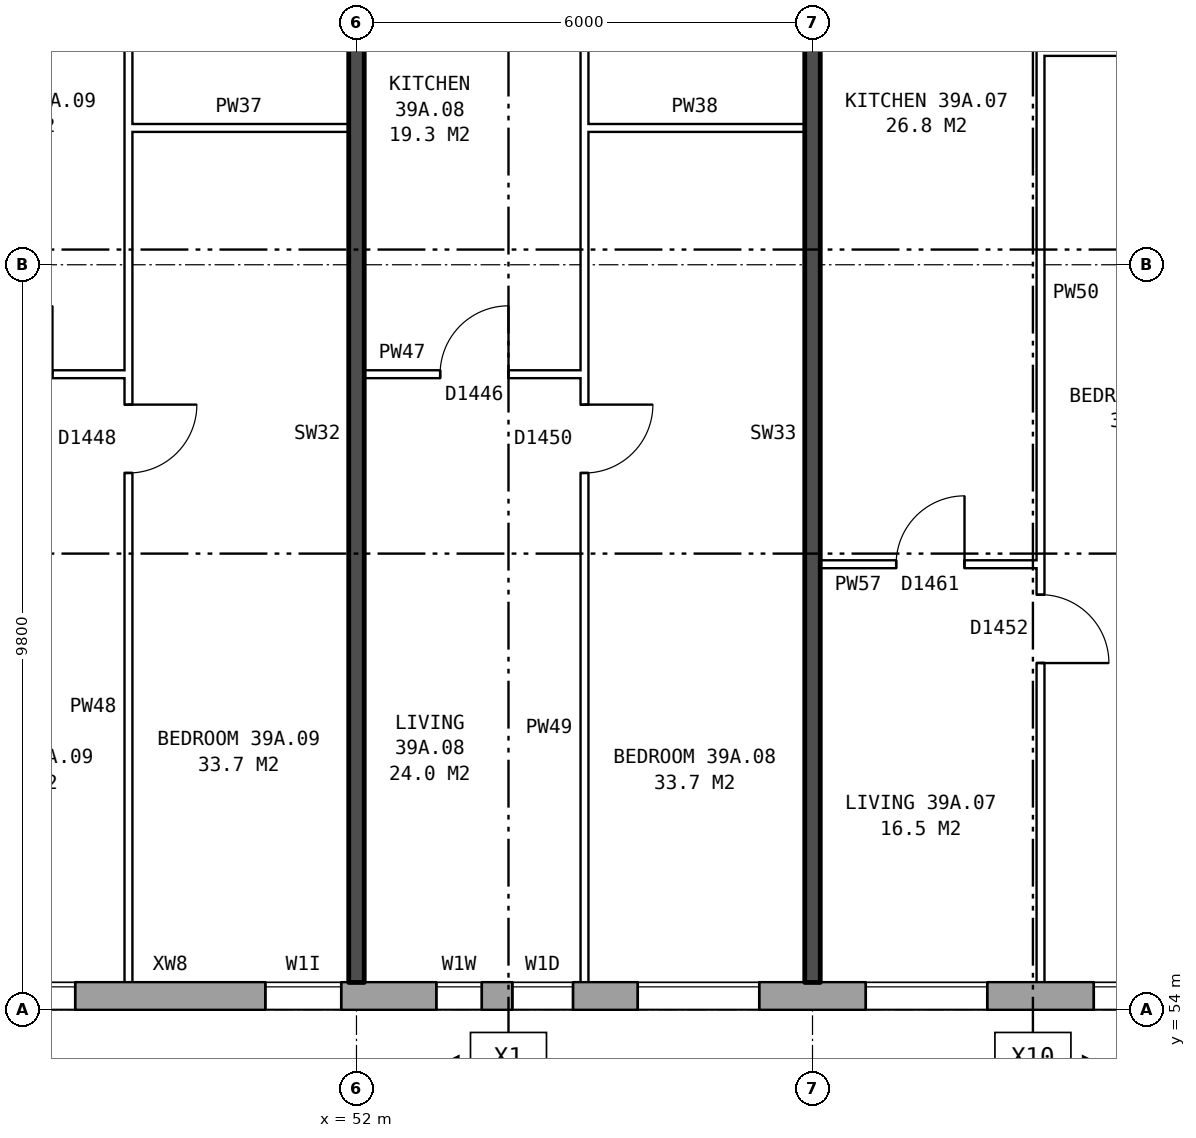
"""IFC4 building model, lengths in metres.
Left out: names, types, materials, properties, quantities, classifications, styles, units other than length and angle.
Written with IfcOpenShell. Run it as: python <this file> out.ifc"""

import sys

from ifc_helpers import new_model, si_unit, direction, frame, frame_2d, origin, place, context, subcontext, project, spatial, rectangle, extrude, element, fill, save


model = new_model("IFC4")
c1 = context("Model", 3, precision=1e-05, world=origin(), true_north=direction((0.0, 1.0)))
c2 = subcontext(c1, "Body", "Model", "MODEL_VIEW")
j1 = project(units=[si_unit("LENGTHUNIT", "METRE"), si_unit("PLANEANGLEUNIT", "RADIAN")], contexts=[c1])
p1 = place(None, origin())
s1 = spatial("IfcSite", under=j1, at=p1, CompositionType="ELEMENT")
p2 = place(p1, origin())
s2 = spatial("IfcBuilding", under=s1, at=p2, CompositionType="ELEMENT")
p3 = place(p2, frame((0.0, 0.0, 139.2)))
s3 = spatial("IfcBuildingStorey", under=s2, at=p3, CompositionType="ELEMENT", Elevation=139.2)
p4 = place(p3, frame((29.825, 54.18, 0.0), z_axis=(0.0, 0.0, 1.0), x_axis=(1.0, 0.0, 0.0)))
e1 = element("IfcWall", 1, at=p4, inside=s3, PredefinedType="STANDARD", context=c2, shape_type="SweptSolid", body=[
    extrude(rectangle(XDim=43.101, YDim=0.36, at=frame_2d((21.55, 0.0))), origin(), (0.0, 0.0, 1.0), 2.85),
])
p5 = place(p4, frame((1.875, 0.0, 0.8)))
e2 = element("IfcOpeningElement", 2, at=p5, cuts=e1, PredefinedType="OPENING", context=c2, shape_type="SweptSolid", body=[
    extrude(rectangle(XDim=1.6, YDim=1.8, at=frame_2d((0.8, 0.9))), frame((0.0, 0.19, 0.0), z_axis=(0.0, -1.0, 0.0), x_axis=(1.0, 0.0, 0.0)), (0.0, 0.0, 1.0), 0.38),
])
p6 = place(p4, frame((4.875, 0.0, 0.8)))
e3 = element("IfcOpeningElement", 3, at=p6, cuts=e1, PredefinedType="OPENING", context=c2, shape_type="SweptSolid", body=[
    extrude(rectangle(XDim=1.6, YDim=1.8, at=frame_2d((0.8, 0.9))), frame((0.0, 0.19, 0.0), z_axis=(0.0, -1.0, 0.0), x_axis=(1.0, 0.0, 0.0)), (0.0, 0.0, 1.0), 0.38),
])
p7 = place(p4, frame((7.875, 0.0, 0.8)))
e4 = element("IfcOpeningElement", 4, at=p7, cuts=e1, PredefinedType="OPENING", context=c2, shape_type="SweptSolid", body=[
    extrude(rectangle(XDim=1.6, YDim=1.8, at=frame_2d((0.8, 0.9))), frame((0.0, 0.19, 0.0), z_axis=(0.0, -1.0, 0.0), x_axis=(1.0, 0.0, 0.0)), (0.0, 0.0, 1.0), 0.38),
])
p8 = place(p4, frame((10.875, 0.0, 0.8)))
e5 = element("IfcOpeningElement", 5, at=p8, cuts=e1, PredefinedType="OPENING", context=c2, shape_type="SweptSolid", body=[
    extrude(rectangle(XDim=1.6, YDim=1.8, at=frame_2d((0.8, 0.9))), frame((0.0, 0.19, 0.0), z_axis=(0.0, -1.0, 0.0), x_axis=(1.0, 0.0, 0.0)), (0.0, 0.0, 1.0), 0.38),
])
p9 = place(p4, frame((13.875, 0.0, 0.8)))
e6 = element("IfcOpeningElement", 6, at=p9, cuts=e1, PredefinedType="OPENING", context=c2, shape_type="SweptSolid", body=[
    extrude(rectangle(XDim=1.6, YDim=1.8, at=frame_2d((0.8, 0.9))), frame((0.0, 0.19, 0.0), z_axis=(0.0, -1.0, 0.0), x_axis=(1.0, 0.0, 0.0)), (0.0, 0.0, 1.0), 0.38),
])
p10 = place(p4, frame((16.875, 0.0, 0.8)))
e7 = element("IfcOpeningElement", 7, at=p10, cuts=e1, PredefinedType="OPENING", context=c2, shape_type="SweptSolid", body=[
    extrude(rectangle(XDim=1.6, YDim=1.8, at=frame_2d((0.8, 0.9))), frame((0.0, 0.19, 0.0), z_axis=(0.0, -1.0, 0.0), x_axis=(1.0, 0.0, 0.0)), (0.0, 0.0, 1.0), 0.38),
])
p11 = place(p4, frame((20.975, 0.0, 0.15)))
e8 = element("IfcOpeningElement", 8, at=p11, cuts=e1, PredefinedType="OPENING", context=c2, shape_type="SweptSolid", body=[
    extrude(rectangle(XDim=1.0, YDim=1.5, at=frame_2d((0.5, 0.75))), frame((0.0, 0.19, 0.0), z_axis=(0.0, -1.0, 0.0), x_axis=(1.0, 0.0, 0.0)), (0.0, 0.0, 1.0), 0.38),
])
p12 = place(p4, frame((23.225, 0.0, 1.7)))
e9 = element("IfcOpeningElement", 9, at=p12, cuts=e1, PredefinedType="OPENING", context=c2, shape_type="SweptSolid", body=[
    extrude(rectangle(XDim=0.6, YDim=0.9, at=frame_2d((0.3, 0.45))), frame((0.0, 0.19, 0.0), z_axis=(0.0, -1.0, 0.0), x_axis=(1.0, 0.0, 0.0)), (0.0, 0.0, 1.0), 0.38),
])
p13 = place(p4, frame((25.875, 0.0, 0.8)))
e10 = element("IfcOpeningElement", 10, at=p13, cuts=e1, PredefinedType="OPENING", context=c2, shape_type="SweptSolid", body=[
    extrude(rectangle(XDim=1.6, YDim=1.8, at=frame_2d((0.8, 0.9))), frame((0.0, 0.19, 0.0), z_axis=(0.0, -1.0, 0.0), x_axis=(1.0, 0.0, 0.0)), (0.0, 0.0, 1.0), 0.38),
])
p14 = place(p4, frame((28.875, 0.0, 0.8)))
e11 = element("IfcOpeningElement", 11, at=p14, cuts=e1, PredefinedType="OPENING", context=c2, shape_type="SweptSolid", body=[
    extrude(rectangle(XDim=1.6, YDim=1.8, at=frame_2d((0.8, 0.9))), frame((0.0, 0.19, 0.0), z_axis=(0.0, -1.0, 0.0), x_axis=(1.0, 0.0, 0.0)), (0.0, 0.0, 1.0), 0.38),
])
p15 = place(p4, frame((31.875, 0.0, 0.8)))
e12 = element("IfcOpeningElement", 12, at=p15, cuts=e1, PredefinedType="OPENING", context=c2, shape_type="SweptSolid", body=[
    extrude(rectangle(XDim=1.6, YDim=1.8, at=frame_2d((0.8, 0.9))), frame((0.0, 0.19, 0.0), z_axis=(0.0, -1.0, 0.0), x_axis=(1.0, 0.0, 0.0)), (0.0, 0.0, 1.0), 0.38),
])
p16 = place(p4, frame((34.875, 0.0, 0.8)))
e13 = element("IfcOpeningElement", 13, at=p16, cuts=e1, PredefinedType="OPENING", context=c2, shape_type="SweptSolid", body=[
    extrude(rectangle(XDim=1.6, YDim=1.8, at=frame_2d((0.8, 0.9))), frame((0.0, 0.19, 0.0), z_axis=(0.0, -1.0, 0.0), x_axis=(1.0, 0.0, 0.0)), (0.0, 0.0, 1.0), 0.38),
])
p17 = place(p4, frame((37.875, 0.0, 0.8)))
e14 = element("IfcOpeningElement", 14, at=p17, cuts=e1, PredefinedType="OPENING", context=c2, shape_type="SweptSolid", body=[
    extrude(rectangle(XDim=1.6, YDim=1.8, at=frame_2d((0.8, 0.9))), frame((0.0, 0.19, 0.0), z_axis=(0.0, -1.0, 0.0), x_axis=(1.0, 0.0, 0.0)), (0.0, 0.0, 1.0), 0.38),
])
p18 = place(p4, frame((40.875, 0.0, 0.8)))
e15 = element("IfcOpeningElement", 15, at=p18, cuts=e1, PredefinedType="OPENING", context=c2, shape_type="SweptSolid", body=[
    extrude(rectangle(XDim=1.6, YDim=1.8, at=frame_2d((0.8, 0.9))), frame((0.0, 0.19, 0.0), z_axis=(0.0, -1.0, 0.0), x_axis=(1.0, 0.0, 0.0)), (0.0, 0.0, 1.0), 0.38),
])
p19 = place(p4, frame((24.225, 0.0, 0.8)))
e16 = element("IfcOpeningElement", 16, at=p19, cuts=e1, PredefinedType="OPENING", context=c2, shape_type="SweptSolid", body=[
    extrude(rectangle(XDim=0.8, YDim=1.8, at=frame_2d((0.4, 0.9))), frame((0.0, 0.19, 0.0), z_axis=(0.0, -1.0, 0.0), x_axis=(1.0, 0.0, 0.0)), (0.0, 0.0, 1.0), 0.38),
])
p20 = place(p3, frame((58.1, 59.86, 0.0), z_axis=(0.0, 0.0, 1.0), x_axis=(1.0, 0.0, 0.0)))
e17 = element("IfcWall", 17, at=p20, inside=s3, PredefinedType="PARTITIONING", context=c2, shape_type="SweptSolid", body=[
    extrude(rectangle(XDim=2.9, YDim=0.1, at=frame_2d((1.45, 0.0))), origin(), (0.0, 0.0, 1.0), 2.85),
])
p21 = place(p20, frame((1.0, 0.0, 0.0)))
e18 = element("IfcOpeningElement", 18, at=p21, cuts=e17, PredefinedType="OPENING", context=c2, shape_type="SweptSolid", body=[
    extrude(rectangle(XDim=0.9, YDim=2.1, at=frame_2d((0.45, 1.05))), frame((0.0, 0.06, 0.0), z_axis=(0.0, -1.0, 0.0), x_axis=(1.0, 0.0, 0.0)), (0.0, 0.0, 1.0), 0.12),
])
p22 = place(p3, frame((46.1, 62.36, 0.0), z_axis=(0.0, 0.0, 1.0), x_axis=(1.0, 0.0, 0.0)))
e19 = element("IfcWall", 19, at=p22, inside=s3, PredefinedType="PARTITIONING", context=c2, shape_type="SweptSolid", body=[
    extrude(rectangle(XDim=2.9, YDim=0.1, at=frame_2d((1.45, 0.0))), origin(), (0.0, 0.0, 1.0), 2.85),
])
p23 = place(p22, frame((1.0, 0.0, 0.0)))
e20 = element("IfcOpeningElement", 20, at=p23, cuts=e19, PredefinedType="OPENING", context=c2, shape_type="SweptSolid", body=[
    extrude(rectangle(XDim=0.9, YDim=2.1, at=frame_2d((0.45, 1.05))), frame((0.0, 0.06, 0.0), z_axis=(0.0, -1.0, 0.0), x_axis=(1.0, 0.0, 0.0)), (0.0, 0.0, 1.0), 0.12),
])
p24 = place(p3, frame((52.1, 62.36, 0.0), z_axis=(0.0, 0.0, 1.0), x_axis=(1.0, 0.0, 0.0)))
e21 = element("IfcWall", 21, at=p24, inside=s3, PredefinedType="PARTITIONING", context=c2, shape_type="SweptSolid", body=[
    extrude(rectangle(XDim=2.9, YDim=0.1, at=frame_2d((1.45, 0.0))), origin(), (0.0, 0.0, 1.0), 2.85),
])
p25 = place(p24, frame((1.0, 0.0, 0.0)))
e22 = element("IfcOpeningElement", 22, at=p25, cuts=e21, PredefinedType="OPENING", context=c2, shape_type="SweptSolid", body=[
    extrude(rectangle(XDim=0.9, YDim=2.1, at=frame_2d((0.45, 1.05))), frame((0.0, 0.06, 0.0), z_axis=(0.0, -1.0, 0.0), x_axis=(1.0, 0.0, 0.0)), (0.0, 0.0, 1.0), 0.12),
])
for number, where, z_axis, x_axis in (
    (23, (49.0, 65.6, 0.0), (0.0, 0.0, 1.0), (1.0, 0.0, 0.0)),
    (24, (55.0, 65.6, 0.0), (0.0, 0.0, 1.0), (1.0, 0.0, 0.0)),
):
    element("IfcWall", number, at=place(p3, frame(where, z_axis=z_axis, x_axis=x_axis)), inside=s3, PredefinedType="PARTITIONING", context=c2, shape_type="SweptSolid", body=[
        extrude(rectangle(XDim=2.9, YDim=0.1, at=frame_2d((1.45, 0.0))), origin(), (0.0, 0.0, 1.0), 2.85),
    ])
p26 = place(p3, frame((61.0, 66.6, 0.0), z_axis=(0.0, 0.0, 1.0), x_axis=(1.0, 0.0, 0.0)))
e25 = element("IfcWall", 25, at=p26, inside=s3, PredefinedType="PARTITIONING", context=c2, shape_type="SweptSolid", body=[
    extrude(rectangle(XDim=2.64, YDim=0.1, at=frame_2d((1.32, 0.0))), origin(), (0.0, 0.0, 1.0), 2.85),
])
p27 = place(p3, frame((49.0, 54.36, 0.0), z_axis=(0.0, 0.0, 1.0), x_axis=(0.0, 1.0, 0.0)))
e26 = element("IfcWall", 26, at=p27, inside=s3, PredefinedType="PARTITIONING", context=c2, shape_type="SweptSolid", body=[
    extrude(rectangle(XDim=14.34, YDim=0.1, at=frame_2d((7.17, 0.0))), origin(), (0.0, 0.0, 1.0), 2.85),
])
p28 = place(p27, frame((6.7, 0.0, 0.0)))
e27 = element("IfcOpeningElement", 27, at=p28, cuts=e26, PredefinedType="OPENING", context=c2, shape_type="SweptSolid", body=[
    extrude(rectangle(XDim=0.9, YDim=2.1, at=frame_2d((0.45, 1.05))), frame((0.0, 0.06, 0.0), z_axis=(0.0, -1.0, 0.0), x_axis=(1.0, 0.0, 0.0)), (0.0, 0.0, 1.0), 0.12),
])
p29 = place(p27, frame((13.04, 0.0, 0.0)))
e28 = element("IfcOpeningElement", 28, at=p29, cuts=e26, PredefinedType="OPENING", context=c2, shape_type="SweptSolid", body=[
    extrude(rectangle(XDim=0.9, YDim=2.1, at=frame_2d((0.45, 1.05))), frame((0.0, 0.06, 0.0), z_axis=(0.0, -1.0, 0.0), x_axis=(1.0, 0.0, 0.0)), (0.0, 0.0, 1.0), 0.12),
])
p30 = place(p3, frame((52.0, 54.36, 0.0), z_axis=(0.0, 0.0, 1.0), x_axis=(0.0, 1.0, 0.0)))
e29 = element("IfcWall", 29, at=p30, inside=s3, PredefinedType="SOLIDWALL", context=c2, shape_type="SweptSolid", body=[
    extrude(rectangle(XDim=14.44, YDim=0.2, at=frame_2d((7.22, 0.0))), origin(), (0.0, 0.0, 1.0), 2.85),
])
p31 = place(p3, frame((55.0, 54.36, 0.0), z_axis=(0.0, 0.0, 1.0), x_axis=(0.0, 1.0, 0.0)))
e30 = element("IfcWall", 30, at=p31, inside=s3, PredefinedType="PARTITIONING", context=c2, shape_type="SweptSolid", body=[
    extrude(rectangle(XDim=14.34, YDim=0.1, at=frame_2d((7.17, 0.0))), origin(), (0.0, 0.0, 1.0), 2.85),
])
p32 = place(p31, frame((6.7, 0.0, 0.0)))
e31 = element("IfcOpeningElement", 31, at=p32, cuts=e30, PredefinedType="OPENING", context=c2, shape_type="SweptSolid", body=[
    extrude(rectangle(XDim=0.9, YDim=2.1, at=frame_2d((0.45, 1.05))), frame((0.0, 0.06, 0.0), z_axis=(0.0, -1.0, 0.0), x_axis=(1.0, 0.0, 0.0)), (0.0, 0.0, 1.0), 0.12),
])
p33 = place(p31, frame((13.04, 0.0, 0.0)))
e32 = element("IfcOpeningElement", 32, at=p33, cuts=e30, PredefinedType="OPENING", context=c2, shape_type="SweptSolid", body=[
    extrude(rectangle(XDim=0.9, YDim=2.1, at=frame_2d((0.45, 1.05))), frame((0.0, 0.06, 0.0), z_axis=(0.0, -1.0, 0.0), x_axis=(1.0, 0.0, 0.0)), (0.0, 0.0, 1.0), 0.12),
])
p34 = place(p3, frame((58.0, 54.36, 0.0), z_axis=(0.0, 0.0, 1.0), x_axis=(0.0, 1.0, 0.0)))
e33 = element("IfcWall", 33, at=p34, inside=s3, PredefinedType="SOLIDWALL", context=c2, shape_type="SweptSolid", body=[
    extrude(rectangle(XDim=14.44, YDim=0.2, at=frame_2d((7.22, 0.0))), origin(), (0.0, 0.0, 1.0), 2.85),
])
p35 = place(p3, frame((61.0, 54.36, 0.0), z_axis=(0.0, 0.0, 1.0), x_axis=(0.0, 1.0, 0.0)))
e34 = element("IfcWall", 34, at=p35, inside=s3, PredefinedType="PARTITIONING", context=c2, shape_type="SweptSolid", body=[
    extrude(rectangle(XDim=14.34, YDim=0.1, at=frame_2d((7.17, 0.0))), origin(), (0.0, 0.0, 1.0), 2.85),
])
p36 = place(p35, frame((4.2, 0.0, 0.0)))
e35 = element("IfcOpeningElement", 35, at=p36, cuts=e34, PredefinedType="OPENING", context=c2, shape_type="SweptSolid", body=[
    extrude(rectangle(XDim=0.9, YDim=2.1, at=frame_2d((0.45, 1.05))), frame((0.0, 0.06, 0.0), z_axis=(0.0, -1.0, 0.0), x_axis=(1.0, 0.0, 0.0)), (0.0, 0.0, 1.0), 0.12),
])
p37 = place(p35, frame((13.04, 0.0, 0.0)))
e36 = element("IfcOpeningElement", 36, at=p37, cuts=e34, PredefinedType="OPENING", context=c2, shape_type="SweptSolid", body=[
    extrude(rectangle(XDim=0.9, YDim=2.1, at=frame_2d((0.45, 1.05))), frame((0.0, 0.06, 0.0), z_axis=(0.0, -1.0, 0.0), x_axis=(1.0, 0.0, 0.0)), (0.0, 0.0, 1.0), 0.12),
])
p38 = place(p10, origin())
e37 = element("IfcWindow", 37, at=p38, inside=s3, PartitioningType="SINGLE_PANEL", PredefinedType="WINDOW", context=c2, shape_type="SweptSolid", body=[
    extrude(rectangle(XDim=1.6, YDim=1.8, at=frame_2d((0.8, 0.9))), frame((0.0, 0.15, 0.0), z_axis=(0.0, -1.0, 0.0), x_axis=(1.0, 0.0, 0.0)), (0.0, 0.0, 1.0), 0.06),
])
fill(e7, e37)
p39 = place(p11, origin())
e38 = element("IfcWindow", 38, at=p39, inside=s3, PartitioningType="SINGLE_PANEL", PredefinedType="WINDOW", context=c2, shape_type="SweptSolid", body=[
    extrude(rectangle(XDim=1.0, YDim=1.5, at=frame_2d((0.5, 0.75))), frame((0.0, 0.15, 0.0), z_axis=(0.0, -1.0, 0.0), x_axis=(1.0, 0.0, 0.0)), (0.0, 0.0, 1.0), 0.06),
])
fill(e8, e38)
p40 = place(p12, origin())
e39 = element("IfcWindow", 39, at=p40, inside=s3, PartitioningType="SINGLE_PANEL", PredefinedType="WINDOW", context=c2, shape_type="SweptSolid", body=[
    extrude(rectangle(XDim=0.6, YDim=0.9, at=frame_2d((0.3, 0.45))), frame((0.0, 0.15, 0.0), z_axis=(0.0, -1.0, 0.0), x_axis=(1.0, 0.0, 0.0)), (0.0, 0.0, 1.0), 0.06),
])
fill(e9, e39)
p41 = place(p13, origin())
e40 = element("IfcWindow", 40, at=p41, inside=s3, PartitioningType="SINGLE_PANEL", PredefinedType="WINDOW", context=c2, shape_type="SweptSolid", body=[
    extrude(rectangle(XDim=1.6, YDim=1.8, at=frame_2d((0.8, 0.9))), frame((0.0, 0.15, 0.0), z_axis=(0.0, -1.0, 0.0), x_axis=(1.0, 0.0, 0.0)), (0.0, 0.0, 1.0), 0.06),
])
fill(e10, e40)
p42 = place(p14, origin())
e41 = element("IfcWindow", 41, at=p42, inside=s3, PartitioningType="SINGLE_PANEL", PredefinedType="WINDOW", context=c2, shape_type="SweptSolid", body=[
    extrude(rectangle(XDim=1.6, YDim=1.8, at=frame_2d((0.8, 0.9))), frame((0.0, 0.15, 0.0), z_axis=(0.0, -1.0, 0.0), x_axis=(1.0, 0.0, 0.0)), (0.0, 0.0, 1.0), 0.06),
])
fill(e11, e41)
p43 = place(p15, origin())
e42 = element("IfcWindow", 42, at=p43, inside=s3, PartitioningType="SINGLE_PANEL", PredefinedType="WINDOW", context=c2, shape_type="SweptSolid", body=[
    extrude(rectangle(XDim=1.6, YDim=1.8, at=frame_2d((0.8, 0.9))), frame((0.0, 0.15, 0.0), z_axis=(0.0, -1.0, 0.0), x_axis=(1.0, 0.0, 0.0)), (0.0, 0.0, 1.0), 0.06),
])
fill(e12, e42)
p44 = place(p36, frame((0.9, 0.0, 0.0), z_axis=(0.0, 0.0, 1.0), x_axis=(-1.0, 0.0, 0.0)))
e43 = element("IfcDoor", 43, at=p44, inside=s3, OperationType="SINGLE_SWING_RIGHT", PredefinedType="DOOR", context=c2, shape_type="SweptSolid", body=[
    extrude(rectangle(XDim=0.9, YDim=2.1, at=frame_2d((0.45, 1.05))), frame((0.0, 0.025, 0.0), z_axis=(0.0, -1.0, 0.0), x_axis=(1.0, 0.0, 0.0)), (0.0, 0.0, 1.0), 0.05),
])
fill(e35, e43)
p45 = place(p21, origin())
e44 = element("IfcDoor", 44, at=p45, inside=s3, OperationType="SINGLE_SWING_RIGHT", PredefinedType="DOOR", context=c2, shape_type="SweptSolid", body=[
    extrude(rectangle(XDim=0.9, YDim=2.1, at=frame_2d((0.45, 1.05))), frame((0.0, 0.025, 0.0), z_axis=(0.0, -1.0, 0.0), x_axis=(1.0, 0.0, 0.0)), (0.0, 0.0, 1.0), 0.05),
])
fill(e18, e44)
p46 = place(p32, frame((0.9, 0.0, 0.0), z_axis=(0.0, 0.0, 1.0), x_axis=(-1.0, 0.0, 0.0)))
e45 = element("IfcDoor", 45, at=p46, inside=s3, OperationType="SINGLE_SWING_LEFT", PredefinedType="DOOR", context=c2, shape_type="SweptSolid", body=[
    extrude(rectangle(XDim=0.9, YDim=2.1, at=frame_2d((0.45, 1.05))), frame((0.0, 0.025, 0.0), z_axis=(0.0, -1.0, 0.0), x_axis=(1.0, 0.0, 0.0)), (0.0, 0.0, 1.0), 0.05),
])
fill(e31, e45)
p47 = place(p25, origin())
e46 = element("IfcDoor", 46, at=p47, inside=s3, OperationType="SINGLE_SWING_RIGHT", PredefinedType="DOOR", context=c2, shape_type="SweptSolid", body=[
    extrude(rectangle(XDim=0.9, YDim=2.1, at=frame_2d((0.45, 1.05))), frame((0.0, 0.025, 0.0), z_axis=(0.0, -1.0, 0.0), x_axis=(1.0, 0.0, 0.0)), (0.0, 0.0, 1.0), 0.05),
])
fill(e22, e46)
p48 = place(p28, frame((0.9, 0.0, 0.0), z_axis=(0.0, 0.0, 1.0), x_axis=(-1.0, 0.0, 0.0)))
e47 = element("IfcDoor", 47, at=p48, inside=s3, OperationType="SINGLE_SWING_LEFT", PredefinedType="DOOR", context=c2, shape_type="SweptSolid", body=[
    extrude(rectangle(XDim=0.9, YDim=2.1, at=frame_2d((0.45, 1.05))), frame((0.0, 0.025, 0.0), z_axis=(0.0, -1.0, 0.0), x_axis=(1.0, 0.0, 0.0)), (0.0, 0.0, 1.0), 0.05),
])
fill(e27, e47)
p49 = place(p19, origin())
e48 = element("IfcWindow", 48, at=p49, inside=s3, PartitioningType="SINGLE_PANEL", PredefinedType="WINDOW", context=c2, shape_type="SweptSolid", body=[
    extrude(rectangle(XDim=0.8, YDim=1.8, at=frame_2d((0.4, 0.9))), frame((0.0, 0.15, 0.0), z_axis=(0.0, -1.0, 0.0), x_axis=(1.0, 0.0, 0.0)), (0.0, 0.0, 1.0), 0.06),
])
fill(e16, e48)
save(model, sys.argv[1])
